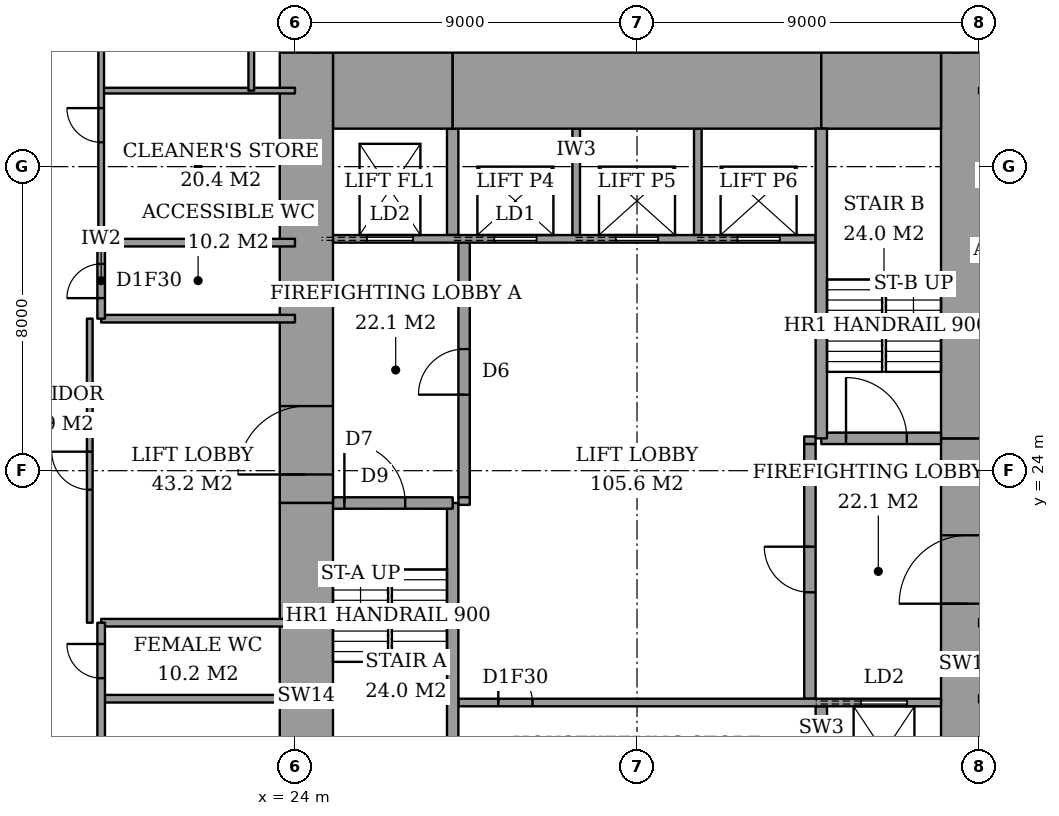
"""IFC4 building model, lengths in metres.
Left out: names, types, materials, properties, quantities, classifications, styles, units other than length and angle.
Written with IfcOpenShell. Run it as: python <this file> out.ifc"""

import sys

from ifc_helpers import new_model, si_unit, direction, frame, frame_2d, origin, place, context, subcontext, project, spatial, rectangle, extrude, element, fill, save


model = new_model("IFC4")
c1 = context("Model", 3, precision=1e-05, world=origin(), true_north=direction((0.0, 1.0)))
c2 = subcontext(c1, "Body", "Model", "MODEL_VIEW")
j1 = project(units=[si_unit("LENGTHUNIT", "METRE"), si_unit("PLANEANGLEUNIT", "RADIAN")], contexts=[c1])
p1 = place(None, origin())
s1 = spatial("IfcSite", under=j1, at=p1, CompositionType="ELEMENT")
p2 = place(p1, origin())
s2 = spatial("IfcBuilding", under=s1, at=p2, CompositionType="ELEMENT")
p3 = place(p2, frame((0.0, 0.0, 200.2)))
s3 = spatial("IfcBuildingStorey", under=s2, at=p3, CompositionType="ELEMENT", Elevation=200.2)
p4 = place(p3, frame((25.0, 34.0, 0.0), z_axis=(0.0, 0.0, 1.0), x_axis=(1.0, 0.0, 0.0)))
e1 = element("IfcWall", 1, at=p4, inside=s3, PredefinedType="SHEAR", context=c2, shape_type="SweptSolid", body=[
    extrude(rectangle(XDim=3.15, YDim=2.0, at=frame_2d((1.575, 0.0))), origin(), (0.0, 0.0, 1.0), 3.6),
])
p5 = place(p3, frame((28.15, 34.0, 0.0), z_axis=(0.0, 0.0, 1.0), x_axis=(1.0, 0.0, 0.0)))
e2 = element("IfcWall", 2, at=p5, inside=s3, PredefinedType="SHEAR", context=c2, shape_type="SweptSolid", body=[
    extrude(rectangle(XDim=9.7, YDim=2.0, at=frame_2d((4.85, 0.0))), origin(), (0.0, 0.0, 1.0), 3.6),
])
p6 = place(p3, frame((37.85, 34.0, 0.0), z_axis=(0.0, 0.0, 1.0), x_axis=(1.0, 0.0, 0.0)))
e3 = element("IfcWall", 3, at=p6, inside=s3, PredefinedType="SHEAR", context=c2, shape_type="SweptSolid", body=[
    extrude(rectangle(XDim=3.15, YDim=2.0, at=frame_2d((1.575, 0.0))), origin(), (0.0, 0.0, 1.0), 3.6),
])
p7 = place(p3, frame((24.3, 13.0, 0.0), z_axis=(0.0, 0.0, 1.0), x_axis=(0.0, 1.0, 0.0)))
e4 = element("IfcWall", 4, at=p7, inside=s3, PredefinedType="SHEAR", context=c2, shape_type="SweptSolid", body=[
    extrude(rectangle(XDim=10.15, YDim=1.4, at=frame_2d((5.075, 0.0))), origin(), (0.0, 0.0, 1.0), 3.6),
])
p8 = place(p3, frame((24.3, 23.15, 0.0), z_axis=(0.0, 0.0, 1.0), x_axis=(0.0, 1.0, 0.0)))
e5 = element("IfcWall", 5, at=p8, inside=s3, PredefinedType="SHEAR", context=c2, shape_type="SweptSolid", body=[
    extrude(rectangle(XDim=11.85, YDim=1.4, at=frame_2d((5.925, 0.0))), origin(), (0.0, 0.0, 1.0), 3.6),
])
p9 = place(p8, frame((0.75, 0.0, 0.0)))
e6 = element("IfcOpeningElement", 6, at=p9, cuts=e5, PredefinedType="OPENING", context=c2, shape_type="SweptSolid", body=[
    extrude(rectangle(XDim=1.8, YDim=2.4, at=frame_2d((0.9, 1.2))), frame((0.0, 0.71, 0.0), z_axis=(0.0, -1.0, 0.0), x_axis=(1.0, 0.0, 0.0)), (0.0, 0.0, 1.0), 1.42),
])
p10 = place(p3, frame((41.7, 13.0, 0.0), z_axis=(0.0, 0.0, 1.0), x_axis=(0.0, 1.0, 0.0)))
e7 = element("IfcWall", 7, at=p10, inside=s3, PredefinedType="SHEAR", context=c2, shape_type="SweptSolid", body=[
    extrude(rectangle(XDim=11.85, YDim=1.4, at=frame_2d((5.925, 0.0))), origin(), (0.0, 0.0, 1.0), 3.6),
])
p11 = place(p10, frame((7.5, 0.0, 0.0)))
e8 = element("IfcOpeningElement", 8, at=p11, cuts=e7, PredefinedType="OPENING", context=c2, shape_type="SweptSolid", body=[
    extrude(rectangle(XDim=1.8, YDim=2.4, at=frame_2d((0.9, 1.2))), frame((0.0, 0.71, 0.0), z_axis=(0.0, -1.0, 0.0), x_axis=(1.0, 0.0, 0.0)), (0.0, 0.0, 1.0), 1.42),
])
p12 = place(p3, frame((41.7, 24.85, 0.0), z_axis=(0.0, 0.0, 1.0), x_axis=(0.0, 1.0, 0.0)))
e9 = element("IfcWall", 9, at=p12, inside=s3, PredefinedType="SHEAR", context=c2, shape_type="SweptSolid", body=[
    extrude(rectangle(XDim=10.15, YDim=1.4, at=frame_2d((5.075, 0.0))), origin(), (0.0, 0.0, 1.0), 3.6),
])
p13 = place(p3, frame((28.15, 15.0, 0.0), z_axis=(0.0, 0.0, 1.0), x_axis=(0.0, 1.0, 0.0)))
e10 = element("IfcWall", 10, at=p13, inside=s3, PredefinedType="SHEAR", context=c2, shape_type="SweptSolid", body=[
    extrude(rectangle(XDim=8.15, YDim=0.3, at=frame_2d((4.075, 0.0))), origin(), (0.0, 0.0, 1.0), 3.6),
])
p14 = place(p3, frame((25.0, 23.15, 0.0), z_axis=(0.0, 0.0, 1.0), x_axis=(1.0, 0.0, 0.0)))
e11 = element("IfcWall", 11, at=p14, inside=s3, PredefinedType="SHEAR", context=c2, shape_type="SweptSolid", body=[
    extrude(rectangle(XDim=3.15, YDim=0.3, at=frame_2d((1.575, 0.0))), origin(), (0.0, 0.0, 1.0), 3.6),
])
p15 = place(p14, frame((0.3, 0.0, 0.0)))
e12 = element("IfcOpeningElement", 12, at=p15, cuts=e11, PredefinedType="OPENING", context=c2, shape_type="SweptSolid", body=[
    extrude(rectangle(XDim=1.6, YDim=2.1, at=frame_2d((0.8, 1.05))), frame((0.0, 0.16, 0.0), z_axis=(0.0, -1.0, 0.0), x_axis=(1.0, 0.0, 0.0)), (0.0, 0.0, 1.0), 0.32),
])
p16 = place(p3, frame((37.85, 24.85, 0.0), z_axis=(0.0, 0.0, 1.0), x_axis=(0.0, 1.0, 0.0)))
e13 = element("IfcWall", 13, at=p16, inside=s3, PredefinedType="SHEAR", context=c2, shape_type="SweptSolid", body=[
    extrude(rectangle(XDim=8.15, YDim=0.3, at=frame_2d((4.075, 0.0))), origin(), (0.0, 0.0, 1.0), 3.6),
])
p17 = place(p3, frame((37.85, 24.85, 0.0), z_axis=(0.0, 0.0, 1.0), x_axis=(1.0, 0.0, 0.0)))
e14 = element("IfcWall", 14, at=p17, inside=s3, PredefinedType="SHEAR", context=c2, shape_type="SweptSolid", body=[
    extrude(rectangle(XDim=3.15, YDim=0.3, at=frame_2d((1.575, 0.0))), origin(), (0.0, 0.0, 1.0), 3.6),
])
p18 = place(p17, frame((0.65, 0.0, 0.0)))
e15 = element("IfcOpeningElement", 15, at=p18, cuts=e14, PredefinedType="OPENING", context=c2, shape_type="SweptSolid", body=[
    extrude(rectangle(XDim=1.6, YDim=2.1, at=frame_2d((0.8, 1.05))), frame((0.0, 0.16, 0.0), z_axis=(0.0, -1.0, 0.0), x_axis=(1.0, 0.0, 0.0)), (0.0, 0.0, 1.0), 0.32),
])
p19 = place(p3, frame((28.45, 23.3, 0.0), z_axis=(0.0, 0.0, 1.0), x_axis=(0.0, 1.0, 0.0)))
e16 = element("IfcWall", 16, at=p19, inside=s3, PredefinedType="PARTITIONING", context=c2, shape_type="SweptSolid", body=[
    extrude(rectangle(XDim=6.7, YDim=0.3, at=frame_2d((3.35, 0.0))), origin(), (0.0, 0.0, 1.0), 3.6),
])
p20 = place(p19, frame((2.7, 0.0, 0.0)))
e17 = element("IfcOpeningElement", 17, at=p20, cuts=e16, PredefinedType="OPENING", context=c2, shape_type="SweptSolid", body=[
    extrude(rectangle(XDim=1.2, YDim=2.1, at=frame_2d((0.6, 1.05))), frame((0.0, 0.16, 0.0), z_axis=(0.0, -1.0, 0.0), x_axis=(1.0, 0.0, 0.0)), (0.0, 0.0, 1.0), 0.32),
])
p21 = place(p3, frame((37.55, 18.0, 0.0), z_axis=(0.0, 0.0, 1.0), x_axis=(0.0, 1.0, 0.0)))
e18 = element("IfcWall", 18, at=p21, inside=s3, PredefinedType="PARTITIONING", context=c2, shape_type="SweptSolid", body=[
    extrude(rectangle(XDim=6.7, YDim=0.3, at=frame_2d((3.35, 0.0))), origin(), (0.0, 0.0, 1.0), 3.6),
])
p22 = place(p21, frame((2.8, 0.0, 0.0)))
e19 = element("IfcOpeningElement", 19, at=p22, cuts=e18, PredefinedType="OPENING", context=c2, shape_type="SweptSolid", body=[
    extrude(rectangle(XDim=1.2, YDim=2.1, at=frame_2d((0.6, 1.05))), frame((0.0, 0.16, 0.0), z_axis=(0.0, -1.0, 0.0), x_axis=(1.0, 0.0, 0.0)), (0.0, 0.0, 1.0), 0.32),
])
for number, where, z_axis, x_axis in (
    (20, (18.9, 18.0, 0.0), (0.0, 0.0, 1.0), (1.0, 0.0, 0.0)),
    (21, (18.9, 20.0, 0.0), (0.0, 0.0, 1.0), (1.0, 0.0, 0.0)),
    (22, (18.9, 28.0, 0.0), (0.0, 0.0, 1.0), (1.0, 0.0, 0.0)),
    (23, (18.9, 30.0, 0.0), (0.0, 0.0, 1.0), (1.0, 0.0, 0.0)),
):
    element("IfcWall", number, at=place(p3, frame(where, z_axis=z_axis, x_axis=x_axis)), inside=s3, PredefinedType="PARTITIONING", context=c2, shape_type="SweptSolid", body=[
        extrude(rectangle(XDim=5.1, YDim=0.2, at=frame_2d((2.55, 0.0))), origin(), (0.0, 0.0, 1.0), 3.35),
    ])
p23 = place(p3, frame((18.9, 34.0, 0.0), z_axis=(0.0, 0.0, 1.0), x_axis=(1.0, 0.0, 0.0)))
e24 = element("IfcWall", 24, at=p23, inside=s3, PredefinedType="PARTITIONING", context=c2, shape_type="SweptSolid", body=[
    extrude(rectangle(XDim=5.1, YDim=0.15, at=frame_2d((2.55, 0.0))), origin(), (0.0, 0.0, 1.0), 3.35),
])
p24 = place(p3, frame((18.6, 20.0, 0.0), z_axis=(0.0, 0.0, 1.0), x_axis=(0.0, 1.0, 0.0)))
e25 = element("IfcWall", 25, at=p24, inside=s3, PredefinedType="PARTITIONING", context=c2, shape_type="SweptSolid", body=[
    extrude(rectangle(XDim=8.0, YDim=0.15, at=frame_2d((4.0, 0.0))), origin(), (0.0, 0.0, 1.0), 3.35),
])
p25 = place(p24, frame((3.5, 0.0, 0.0)))
e26 = element("IfcOpeningElement", 26, at=p25, cuts=e25, PredefinedType="OPENING", context=c2, shape_type="SweptSolid", body=[
    extrude(rectangle(XDim=1.0, YDim=2.1, at=frame_2d((0.5, 1.05))), frame((0.0, 0.085, 0.0), z_axis=(0.0, -1.0, 0.0), x_axis=(1.0, 0.0, 0.0)), (0.0, 0.0, 1.0), 0.17),
])
p26 = place(p3, frame((18.9, 14.0, 0.0), z_axis=(0.0, 0.0, 1.0), x_axis=(0.0, 1.0, 0.0)))
e27 = element("IfcWall", 27, at=p26, inside=s3, PredefinedType="PARTITIONING", context=c2, shape_type="SweptSolid", body=[
    extrude(rectangle(XDim=6.0, YDim=0.2, at=frame_2d((3.0, 0.0))), origin(), (0.0, 0.0, 1.0), 3.35),
])
p27 = place(p26, frame((0.44, 0.0, 0.0)))
e28 = element("IfcOpeningElement", 28, at=p27, cuts=e27, PredefinedType="OPENING", context=c2, shape_type="SweptSolid", body=[
    extrude(rectangle(XDim=0.9, YDim=2.1, at=frame_2d((0.45, 1.05))), frame((0.0, 0.11, 0.0), z_axis=(0.0, -1.0, 0.0), x_axis=(1.0, 0.0, 0.0)), (0.0, 0.0, 1.0), 0.22),
])
p28 = place(p26, frame((4.54, 0.0, 0.0)))
e29 = element("IfcOpeningElement", 29, at=p28, cuts=e27, PredefinedType="OPENING", context=c2, shape_type="SweptSolid", body=[
    extrude(rectangle(XDim=0.9, YDim=2.1, at=frame_2d((0.45, 1.05))), frame((0.0, 0.11, 0.0), z_axis=(0.0, -1.0, 0.0), x_axis=(1.0, 0.0, 0.0)), (0.0, 0.0, 1.0), 0.22),
])
p29 = place(p3, frame((18.9, 28.0, 0.0), z_axis=(0.0, 0.0, 1.0), x_axis=(0.0, 1.0, 0.0)))
e30 = element("IfcWall", 30, at=p29, inside=s3, PredefinedType="PARTITIONING", context=c2, shape_type="SweptSolid", body=[
    extrude(rectangle(XDim=2.0, YDim=0.2, at=frame_2d((1.0, 0.0))), origin(), (0.0, 0.0, 1.0), 3.35),
])
p30 = place(p29, frame((0.54, 0.0, 0.0)))
e31 = element("IfcOpeningElement", 31, at=p30, cuts=e30, PredefinedType="OPENING", context=c2, shape_type="SweptSolid", body=[
    extrude(rectangle(XDim=0.9, YDim=2.1, at=frame_2d((0.45, 1.05))), frame((0.0, 0.11, 0.0), z_axis=(0.0, -1.0, 0.0), x_axis=(1.0, 0.0, 0.0)), (0.0, 0.0, 1.0), 0.22),
])
p31 = place(p3, frame((18.9, 30.0, 0.0), z_axis=(0.0, 0.0, 1.0), x_axis=(0.0, 1.0, 0.0)))
e32 = element("IfcWall", 32, at=p31, inside=s3, PredefinedType="PARTITIONING", context=c2, shape_type="SweptSolid", body=[
    extrude(rectangle(XDim=5.6, YDim=0.15, at=frame_2d((2.8, 0.0))), origin(), (0.0, 0.0, 1.0), 3.35),
])
p32 = place(p31, frame((2.64, 0.0, 0.0)))
e33 = element("IfcOpeningElement", 33, at=p32, cuts=e32, PredefinedType="OPENING", context=c2, shape_type="SweptSolid", body=[
    extrude(rectangle(XDim=0.9, YDim=2.1, at=frame_2d((0.45, 1.05))), frame((0.0, 0.085, 0.0), z_axis=(0.0, -1.0, 0.0), x_axis=(1.0, 0.0, 0.0)), (0.0, 0.0, 1.0), 0.17),
])
p33 = place(p3, frame((22.85, 34.0, 0.0), z_axis=(0.0, 0.0, 1.0), x_axis=(0.0, 1.0, 0.0)))
e34 = element("IfcWall", 34, at=p33, inside=s3, PredefinedType="PARTITIONING", context=c2, shape_type="SweptSolid", body=[
    extrude(rectangle(XDim=4.7, YDim=0.15, at=frame_2d((2.35, 0.0))), origin(), (0.0, 0.0, 1.0), 3.35),
])
p34 = place(p3, frame((28.3, 17.9, 0.0), z_axis=(0.0, 0.0, 1.0), x_axis=(1.0, 0.0, 0.0)))
e35 = element("IfcWall", 35, at=p34, inside=s3, PredefinedType="PARTITIONING", context=c2, shape_type="SweptSolid", body=[
    extrude(rectangle(XDim=12.7, YDim=0.2, at=frame_2d((6.35, 0.0))), origin(), (0.0, 0.0, 1.0), 3.6),
])
p35 = place(p34, frame((1.05, 0.0, 0.0)))
e36 = element("IfcOpeningElement", 36, at=p35, cuts=e35, PredefinedType="OPENING", context=c2, shape_type="SweptSolid", body=[
    extrude(rectangle(XDim=0.9, YDim=2.1, at=frame_2d((0.45, 1.05))), frame((0.0, 0.11, 0.0), z_axis=(0.0, -1.0, 0.0), x_axis=(1.0, 0.0, 0.0)), (0.0, 0.0, 1.0), 0.22),
])
p36 = place(p34, frame((10.6, 0.0, 0.0)))
e37 = element("IfcOpeningElement", 37, at=p36, cuts=e35, PredefinedType="OPENING", context=c2, shape_type="SweptSolid", body=[
    extrude(rectangle(XDim=1.2, YDim=2.1, at=frame_2d((0.6, 1.05))), frame((0.0, 0.11, 0.0), z_axis=(0.0, -1.0, 0.0), x_axis=(1.0, 0.0, 0.0)), (0.0, 0.0, 1.0), 0.22),
])
p37 = place(p3, frame((25.0, 30.1, 0.0), z_axis=(0.0, 0.0, 1.0), x_axis=(1.0, 0.0, 0.0)))
e38 = element("IfcWall", 38, at=p37, inside=s3, PredefinedType="PARTITIONING", context=c2, shape_type="SweptSolid", body=[
    extrude(rectangle(XDim=12.7, YDim=0.2, at=frame_2d((6.35, 0.0))), origin(), (0.0, 0.0, 1.0), 3.6),
])
p38 = place(p37, frame((4.25, 0.0, 0.0)))
e39 = element("IfcOpeningElement", 39, at=p38, cuts=e38, PredefinedType="OPENING", context=c2, shape_type="SweptSolid", body=[
    extrude(rectangle(XDim=1.1, YDim=2.1, at=frame_2d((0.55, 1.05))), frame((0.0, 0.11, 0.0), z_axis=(0.0, -1.0, 0.0), x_axis=(1.0, 0.0, 0.0)), (0.0, 0.0, 1.0), 0.22),
])
p39 = place(p37, frame((7.45, 0.0, 0.0)))
e40 = element("IfcOpeningElement", 40, at=p39, cuts=e38, PredefinedType="OPENING", context=c2, shape_type="SweptSolid", body=[
    extrude(rectangle(XDim=1.1, YDim=2.1, at=frame_2d((0.55, 1.05))), frame((0.0, 0.11, 0.0), z_axis=(0.0, -1.0, 0.0), x_axis=(1.0, 0.0, 0.0)), (0.0, 0.0, 1.0), 0.22),
])
p40 = place(p37, frame((10.65, 0.0, 0.0)))
e41 = element("IfcOpeningElement", 41, at=p40, cuts=e38, PredefinedType="OPENING", context=c2, shape_type="SweptSolid", body=[
    extrude(rectangle(XDim=1.1, YDim=2.1, at=frame_2d((0.55, 1.05))), frame((0.0, 0.11, 0.0), z_axis=(0.0, -1.0, 0.0), x_axis=(1.0, 0.0, 0.0)), (0.0, 0.0, 1.0), 0.22),
])
p41 = place(p37, frame((0.9, 0.0, 0.0)))
e42 = element("IfcOpeningElement", 42, at=p41, cuts=e38, PredefinedType="OPENING", context=c2, shape_type="SweptSolid", body=[
    extrude(rectangle(XDim=1.2, YDim=2.1, at=frame_2d((0.6, 1.05))), frame((0.0, 0.11, 0.0), z_axis=(0.0, -1.0, 0.0), x_axis=(1.0, 0.0, 0.0)), (0.0, 0.0, 1.0), 0.22),
])
p42 = place(p3, frame((37.85, 15.0, 0.0), z_axis=(0.0, 0.0, 1.0), x_axis=(0.0, 1.0, 0.0)))
e43 = element("IfcWall", 43, at=p42, inside=s3, PredefinedType="SHEAR", context=c2, shape_type="SweptSolid", body=[
    extrude(rectangle(XDim=2.8, YDim=0.3, at=frame_2d((1.4, 0.0))), origin(), (0.0, 0.0, 1.0), 3.6),
])
for number, where, z_axis, x_axis in (
    (44, (31.4, 30.2, 0.0), (0.0, 0.0, 1.0), (0.0, 1.0, 0.0)),
    (45, (34.6, 30.2, 0.0), (0.0, 0.0, 1.0), (0.0, 1.0, 0.0)),
):
    element("IfcWall", number, at=place(p3, frame(where, z_axis=z_axis, x_axis=x_axis)), inside=s3, PredefinedType="PARTITIONING", context=c2, shape_type="SweptSolid", body=[
        extrude(rectangle(XDim=2.8, YDim=0.2, at=frame_2d((1.4, 0.0))), origin(), (0.0, 0.0, 1.0), 3.6),
    ])
p43 = place(p3, frame((28.15, 30.2, 0.0), z_axis=(0.0, 0.0, 1.0), x_axis=(0.0, 1.0, 0.0)))
e46 = element("IfcWall", 46, at=p43, inside=s3, PredefinedType="SHEAR", context=c2, shape_type="SweptSolid", body=[
    extrude(rectangle(XDim=2.8, YDim=0.3, at=frame_2d((1.4, 0.0))), origin(), (0.0, 0.0, 1.0), 3.6),
])
for number, where, z_axis, x_axis in (
    (47, (28.3, 23.2, 0.0), (0.0, 0.0, 1.0), (1.0, 0.0, 0.0)),
    (48, (37.4, 24.8, 0.0), (0.0, 0.0, 1.0), (1.0, 0.0, 0.0)),
):
    element("IfcWall", number, at=place(p3, frame(where, z_axis=z_axis, x_axis=x_axis)), inside=s3, PredefinedType="PARTITIONING", context=c2, shape_type="SweptSolid", body=[
        extrude(rectangle(XDim=0.3, YDim=0.2, at=frame_2d((0.15, 0.0))), origin(), (0.0, 0.0, 1.0), 3.6),
    ])
p44 = place(p25, origin())
e49 = element("IfcDoor", 49, at=p44, inside=s3, OperationType="SINGLE_SWING_LEFT", PredefinedType="DOOR", context=c2, shape_type="SweptSolid", body=[
    extrude(rectangle(XDim=1.0, YDim=2.1, at=frame_2d((0.5, 1.05))), frame((0.0, 0.025, 0.0), z_axis=(0.0, -1.0, 0.0), x_axis=(1.0, 0.0, 0.0)), (0.0, 0.0, 1.0), 0.05),
])
fill(e26, e49)
p45 = place(p28, origin())
e50 = element("IfcDoor", 50, at=p45, inside=s3, OperationType="SINGLE_SWING_LEFT", PredefinedType="DOOR", context=c2, shape_type="SweptSolid", body=[
    extrude(rectangle(XDim=0.9, YDim=2.1, at=frame_2d((0.45, 1.05))), frame((0.0, 0.025, 0.0), z_axis=(0.0, -1.0, 0.0), x_axis=(1.0, 0.0, 0.0)), (0.0, 0.0, 1.0), 0.05),
])
fill(e29, e50)
p46 = place(p30, origin())
e51 = element("IfcDoor", 51, at=p46, inside=s3, OperationType="SINGLE_SWING_RIGHT", PredefinedType="DOOR", context=c2, shape_type="SweptSolid", body=[
    extrude(rectangle(XDim=0.9, YDim=2.1, at=frame_2d((0.45, 1.05))), frame((0.0, 0.025, 0.0), z_axis=(0.0, -1.0, 0.0), x_axis=(1.0, 0.0, 0.0)), (0.0, 0.0, 1.0), 0.05),
])
fill(e31, e51)
p47 = place(p32, origin())
e52 = element("IfcDoor", 52, at=p47, inside=s3, OperationType="SINGLE_SWING_LEFT", PredefinedType="DOOR", context=c2, shape_type="SweptSolid", body=[
    extrude(rectangle(XDim=0.9, YDim=2.1, at=frame_2d((0.45, 1.05))), frame((0.0, 0.025, 0.0), z_axis=(0.0, -1.0, 0.0), x_axis=(1.0, 0.0, 0.0)), (0.0, 0.0, 1.0), 0.05),
])
fill(e33, e52)
p48 = place(p15, origin())
e53 = element("IfcDoor", 53, at=p48, inside=s3, OperationType="DOUBLE_DOOR_SINGLE_SWING", PredefinedType="DOOR", context=c2, shape_type="SweptSolid", body=[
    extrude(rectangle(XDim=1.6, YDim=2.1, at=frame_2d((0.8, 1.05))), frame((0.0, 0.025, 0.0), z_axis=(0.0, -1.0, 0.0), x_axis=(1.0, 0.0, 0.0)), (0.0, 0.0, 1.0), 0.05),
])
fill(e12, e53)
p49 = place(p18, origin())
e54 = element("IfcDoor", 54, at=p49, inside=s3, OperationType="DOUBLE_DOOR_SINGLE_SWING", PredefinedType="DOOR", context=c2, shape_type="SweptSolid", body=[
    extrude(rectangle(XDim=1.6, YDim=2.1, at=frame_2d((0.8, 1.05))), frame((0.0, 0.025, 0.0), z_axis=(0.0, -1.0, 0.0), x_axis=(1.0, 0.0, 0.0)), (0.0, 0.0, 1.0), 0.05),
])
fill(e15, e54)
p50 = place(p20, origin())
e55 = element("IfcDoor", 55, at=p50, inside=s3, OperationType="SINGLE_SWING_RIGHT", PredefinedType="DOOR", context=c2, shape_type="SweptSolid", body=[
    extrude(rectangle(XDim=1.2, YDim=2.1, at=frame_2d((0.6, 1.05))), frame((0.0, 0.025, 0.0), z_axis=(0.0, -1.0, 0.0), x_axis=(1.0, 0.0, 0.0)), (0.0, 0.0, 1.0), 0.05),
])
fill(e17, e55)
p51 = place(p22, origin())
e56 = element("IfcDoor", 56, at=p51, inside=s3, OperationType="SINGLE_SWING_LEFT", PredefinedType="DOOR", context=c2, shape_type="SweptSolid", body=[
    extrude(rectangle(XDim=1.2, YDim=2.1, at=frame_2d((0.6, 1.05))), frame((0.0, 0.025, 0.0), z_axis=(0.0, -1.0, 0.0), x_axis=(1.0, 0.0, 0.0)), (0.0, 0.0, 1.0), 0.05),
])
fill(e19, e56)
p52 = place(p9, origin())
e57 = element("IfcDoor", 57, at=p52, inside=s3, OperationType="DOUBLE_DOOR_DOUBLE_SWING", PredefinedType="DOOR", context=c2, shape_type="SweptSolid", body=[
    extrude(rectangle(XDim=1.8, YDim=2.4, at=frame_2d((0.9, 1.2))), frame((0.0, 0.025, 0.0), z_axis=(0.0, -1.0, 0.0), x_axis=(1.0, 0.0, 0.0)), (0.0, 0.0, 1.0), 0.05),
])
fill(e6, e57)
p53 = place(p11, origin())
e58 = element("IfcDoor", 58, at=p53, inside=s3, OperationType="DOUBLE_DOOR_DOUBLE_SWING", PredefinedType="DOOR", context=c2, shape_type="SweptSolid", body=[
    extrude(rectangle(XDim=1.8, YDim=2.4, at=frame_2d((0.9, 1.2))), frame((0.0, 0.025, 0.0), z_axis=(0.0, -1.0, 0.0), x_axis=(1.0, 0.0, 0.0)), (0.0, 0.0, 1.0), 0.05),
])
fill(e8, e58)
p54 = place(p35, origin())
e59 = element("IfcDoor", 59, at=p54, inside=s3, OperationType="SINGLE_SWING_RIGHT", PredefinedType="DOOR", context=c2, shape_type="SweptSolid", body=[
    extrude(rectangle(XDim=0.9, YDim=2.1, at=frame_2d((0.45, 1.05))), frame((0.0, 0.025, 0.0), z_axis=(0.0, -1.0, 0.0), x_axis=(1.0, 0.0, 0.0)), (0.0, 0.0, 1.0), 0.05),
])
fill(e36, e59)
p55 = place(p38, origin())
e60 = element("IfcDoor", 60, at=p55, inside=s3, OperationType="SLIDING_TO_LEFT", PredefinedType="DOOR", context=c2, shape_type="SweptSolid", body=[
    extrude(rectangle(XDim=1.1, YDim=2.1, at=frame_2d((0.55, 1.05))), frame((0.0, 0.025, 0.0), z_axis=(0.0, -1.0, 0.0), x_axis=(1.0, 0.0, 0.0)), (0.0, 0.0, 1.0), 0.05),
])
fill(e39, e60)
p56 = place(p39, origin())
e61 = element("IfcDoor", 61, at=p56, inside=s3, OperationType="SLIDING_TO_LEFT", PredefinedType="DOOR", context=c2, shape_type="SweptSolid", body=[
    extrude(rectangle(XDim=1.1, YDim=2.1, at=frame_2d((0.55, 1.05))), frame((0.0, 0.025, 0.0), z_axis=(0.0, -1.0, 0.0), x_axis=(1.0, 0.0, 0.0)), (0.0, 0.0, 1.0), 0.05),
])
fill(e40, e61)
p57 = place(p40, origin())
e62 = element("IfcDoor", 62, at=p57, inside=s3, OperationType="SLIDING_TO_LEFT", PredefinedType="DOOR", context=c2, shape_type="SweptSolid", body=[
    extrude(rectangle(XDim=1.1, YDim=2.1, at=frame_2d((0.55, 1.05))), frame((0.0, 0.025, 0.0), z_axis=(0.0, -1.0, 0.0), x_axis=(1.0, 0.0, 0.0)), (0.0, 0.0, 1.0), 0.05),
])
fill(e41, e62)
p58 = place(p41, origin())
e63 = element("IfcDoor", 63, at=p58, inside=s3, OperationType="SLIDING_TO_LEFT", PredefinedType="DOOR", context=c2, shape_type="SweptSolid", body=[
    extrude(rectangle(XDim=1.2, YDim=2.1, at=frame_2d((0.6, 1.05))), frame((0.0, 0.025, 0.0), z_axis=(0.0, -1.0, 0.0), x_axis=(1.0, 0.0, 0.0)), (0.0, 0.0, 1.0), 0.05),
])
fill(e42, e63)
p59 = place(p36, origin())
e64 = element("IfcDoor", 64, at=p59, inside=s3, OperationType="SLIDING_TO_LEFT", PredefinedType="DOOR", context=c2, shape_type="SweptSolid", body=[
    extrude(rectangle(XDim=1.2, YDim=2.1, at=frame_2d((0.6, 1.05))), frame((0.0, 0.025, 0.0), z_axis=(0.0, -1.0, 0.0), x_axis=(1.0, 0.0, 0.0)), (0.0, 0.0, 1.0), 0.05),
])
fill(e37, e64)
save(model, sys.argv[1])
